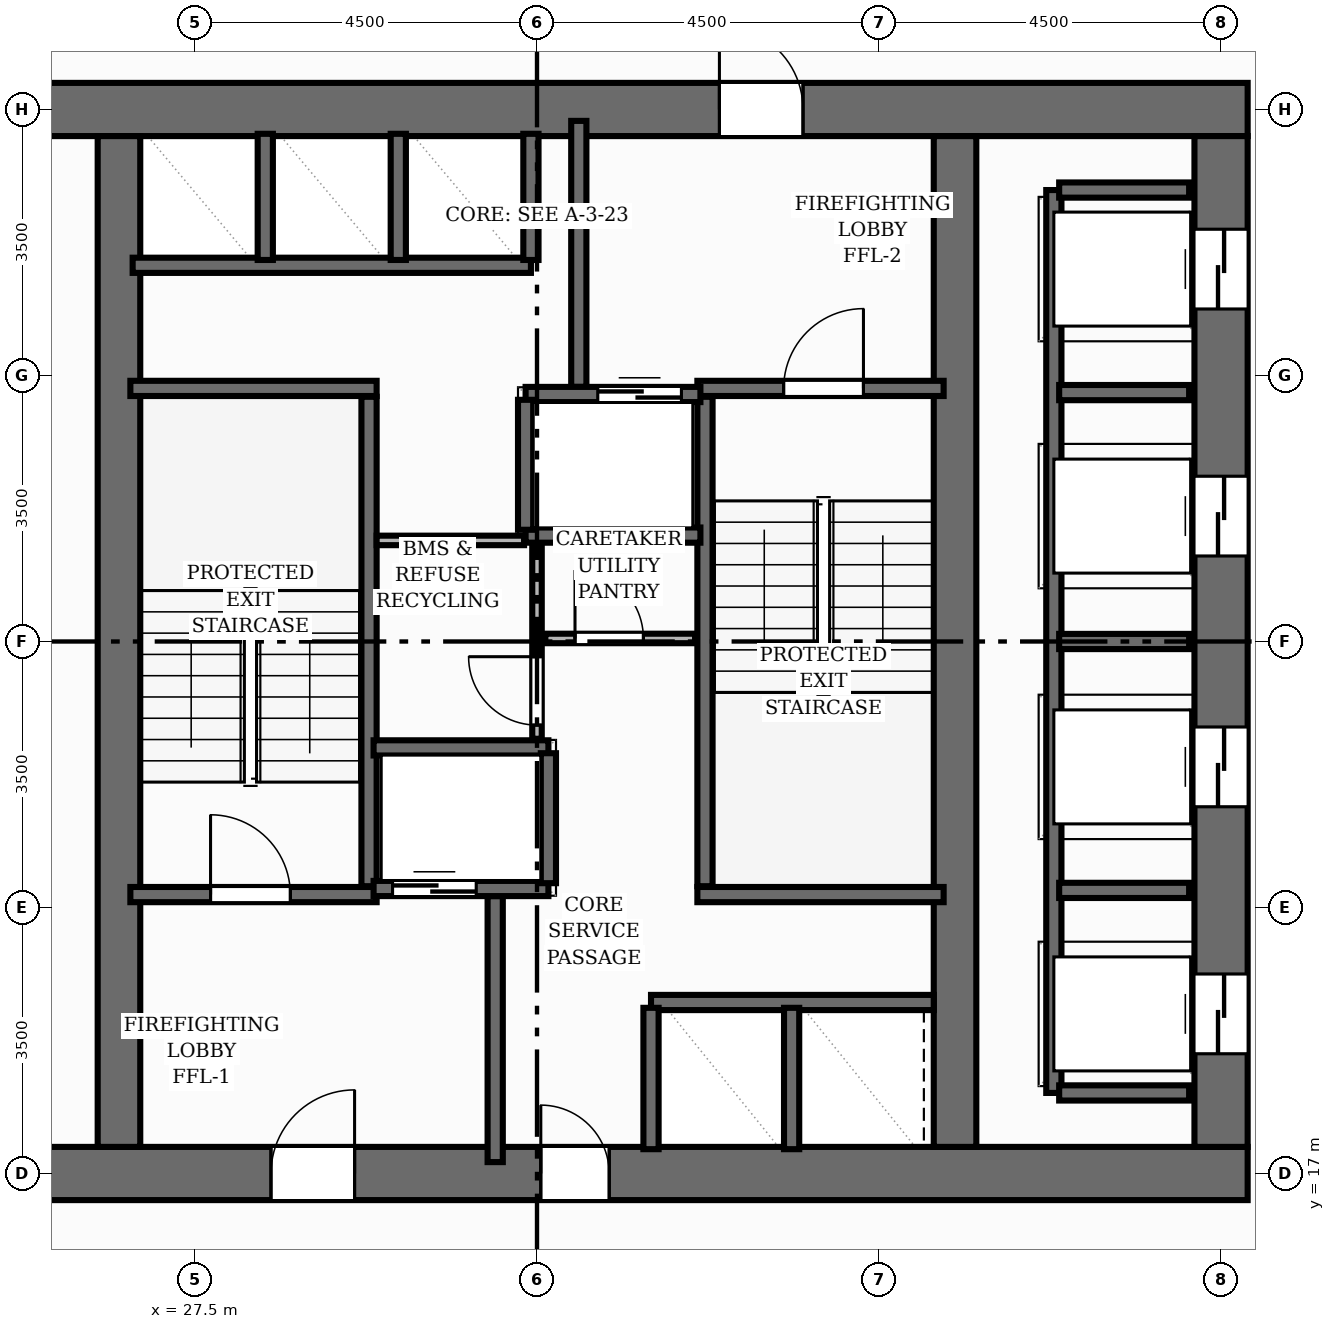
"""IFC4 building model, lengths in metres.
Left out: names, types, materials, properties, quantities, classifications, styles, units other than length and angle.
Written with IfcOpenShell. Run it as: python <this file> out.ifc"""

import sys

from ifc_helpers import new_model, si_unit, direction, frame, frame_2d, origin, place, context, subcontext, project, spatial, rectangle, extrude, element, fill, save


model = new_model("IFC4")
c1 = context("Model", 3, precision=1e-05, world=origin(), true_north=direction((0.0, 1.0)))
c2 = subcontext(c1, "Body", "Model", "MODEL_VIEW")
j1 = project(units=[si_unit("LENGTHUNIT", "METRE"), si_unit("PLANEANGLEUNIT", "RADIAN")], contexts=[c1])
p1 = place(None, origin())
s1 = spatial("IfcSite", under=j1, at=p1, CompositionType="ELEMENT")
p2 = place(p1, origin())
s2 = spatial("IfcBuilding", under=s1, at=p2, CompositionType="ELEMENT")
p3 = place(p2, frame((0.0, 0.0, 90.08)))
s3 = spatial("IfcBuildingStorey", under=s2, at=p3, CompositionType="ELEMENT", Elevation=90.08)
p4 = place(p3, frame((22.65, 17.0, 0.0), z_axis=(0.0, 0.0, 1.0), x_axis=(1.0, 0.0, 0.0)))
e1 = element("IfcWall", 1, at=p4, inside=s3, PredefinedType="SHEAR", context=c2, shape_type="SweptSolid", body=[
    extrude(rectangle(XDim=18.7, YDim=0.7, at=frame_2d((9.35, 0.0))), origin(), (0.0, 0.0, 1.0), 3.2),
])
p5 = place(p4, frame((5.85, 0.0, 0.0)))
e2 = element("IfcOpeningElement", 2, at=p5, cuts=e1, PredefinedType="OPENING", context=c2, shape_type="SweptSolid", body=[
    extrude(rectangle(XDim=1.1, YDim=2.15, at=frame_2d((0.55, 1.075))), frame((0.0, 0.36, 0.0), z_axis=(0.0, -1.0, 0.0), x_axis=(1.0, 0.0, 0.0)), (0.0, 0.0, 1.0), 0.72),
])
p6 = place(p4, frame((9.4, 0.0, 0.0)))
e3 = element("IfcOpeningElement", 3, at=p6, cuts=e1, PredefinedType="OPENING", context=c2, shape_type="SweptSolid", body=[
    extrude(rectangle(XDim=0.9, YDim=2.1, at=frame_2d((0.45, 1.05))), frame((0.0, 0.36, 0.0), z_axis=(0.0, -1.0, 0.0), x_axis=(1.0, 0.0, 0.0)), (0.0, 0.0, 1.0), 0.72),
])
p7 = place(p3, frame((22.65, 31.0, 0.0), z_axis=(0.0, 0.0, 1.0), x_axis=(1.0, 0.0, 0.0)))
e4 = element("IfcWall", 4, at=p7, inside=s3, PredefinedType="SHEAR", context=c2, shape_type="SweptSolid", body=[
    extrude(rectangle(XDim=18.7, YDim=0.7, at=frame_2d((9.35, 0.0))), origin(), (0.0, 0.0, 1.0), 3.2),
])
p8 = place(p7, frame((11.75, 0.0, 0.0)))
e5 = element("IfcOpeningElement", 5, at=p8, cuts=e4, PredefinedType="OPENING", context=c2, shape_type="SweptSolid", body=[
    extrude(rectangle(XDim=1.1, YDim=2.15, at=frame_2d((0.55, 1.075))), frame((0.0, 0.36, 0.0), z_axis=(0.0, -1.0, 0.0), x_axis=(1.0, 0.0, 0.0)), (0.0, 0.0, 1.0), 0.72),
])
p9 = place(p3, frame((41.0, 17.35, 0.0), z_axis=(0.0, 0.0, 1.0), x_axis=(0.0, 1.0, 0.0)))
e6 = element("IfcWall", 6, at=p9, inside=s3, PredefinedType="SHEAR", context=c2, shape_type="SweptSolid", body=[
    extrude(rectangle(XDim=13.3, YDim=0.7, at=frame_2d((6.65, 0.0))), origin(), (0.0, 0.0, 1.0), 3.2),
])
p10 = place(p9, frame((1.225, 0.0, 0.0)))
e7 = element("IfcOpeningElement", 7, at=p10, cuts=e6, PredefinedType="OPENING", context=c2, shape_type="SweptSolid", body=[
    extrude(rectangle(XDim=1.05, YDim=2.15, at=frame_2d((0.525, 1.075))), frame((0.0, 0.36, 0.0), z_axis=(0.0, -1.0, 0.0), x_axis=(1.0, 0.0, 0.0)), (0.0, 0.0, 1.0), 0.72),
])
p11 = place(p9, frame((4.475, 0.0, 0.0)))
e8 = element("IfcOpeningElement", 8, at=p11, cuts=e6, PredefinedType="OPENING", context=c2, shape_type="SweptSolid", body=[
    extrude(rectangle(XDim=1.05, YDim=2.15, at=frame_2d((0.525, 1.075))), frame((0.0, 0.36, 0.0), z_axis=(0.0, -1.0, 0.0), x_axis=(1.0, 0.0, 0.0)), (0.0, 0.0, 1.0), 0.72),
])
p12 = place(p9, frame((7.775, 0.0, 0.0)))
e9 = element("IfcOpeningElement", 9, at=p12, cuts=e6, PredefinedType="OPENING", context=c2, shape_type="SweptSolid", body=[
    extrude(rectangle(XDim=1.05, YDim=2.15, at=frame_2d((0.525, 1.075))), frame((0.0, 0.36, 0.0), z_axis=(0.0, -1.0, 0.0), x_axis=(1.0, 0.0, 0.0)), (0.0, 0.0, 1.0), 0.72),
])
p13 = place(p9, frame((11.025, 0.0, 0.0)))
e10 = element("IfcOpeningElement", 10, at=p13, cuts=e6, PredefinedType="OPENING", context=c2, shape_type="SweptSolid", body=[
    extrude(rectangle(XDim=1.05, YDim=2.15, at=frame_2d((0.525, 1.075))), frame((0.0, 0.36, 0.0), z_axis=(0.0, -1.0, 0.0), x_axis=(1.0, 0.0, 0.0)), (0.0, 0.0, 1.0), 0.72),
])
for number, where, z_axis, x_axis in (
    (11, (26.5, 17.35, 0.0), (0.0, 0.0, 1.0), (0.0, 1.0, 0.0)),
    (12, (37.5, 17.35, 0.0), (0.0, 0.0, 1.0), (0.0, 1.0, 0.0)),
):
    element("IfcWall", number, at=place(p3, frame(where, z_axis=z_axis, x_axis=x_axis)), inside=s3, PredefinedType="SHEAR", context=c2, shape_type="SweptSolid", body=[
        extrude(rectangle(XDim=13.3, YDim=0.56, at=frame_2d((6.65, 0.0))), origin(), (0.0, 0.0, 1.0), 3.2),
    ])
p14 = place(p3, frame((29.79, 20.78, 0.0), z_axis=(0.0, 0.0, 1.0), x_axis=(0.0, 1.0, 0.0)))
e13 = element("IfcWall", 13, at=p14, inside=s3, PredefinedType="SHEAR", context=c2, shape_type="SweptSolid", body=[
    extrude(rectangle(XDim=6.44, YDim=0.2, at=frame_2d((3.22, 0.0))), origin(), (0.0, 0.0, 1.0), 3.2),
])
p15 = place(p3, frame((26.65, 27.33, 0.0), z_axis=(0.0, 0.0, 1.0), x_axis=(1.0, 0.0, 0.0)))
e14 = element("IfcWall", 14, at=p15, inside=s3, PredefinedType="SHEAR", context=c2, shape_type="SweptSolid", body=[
    extrude(rectangle(XDim=3.24, YDim=0.2, at=frame_2d((1.62, 0.0))), origin(), (0.0, 0.0, 1.0), 3.2),
])
p16 = place(p3, frame((26.65, 20.67, 0.0), z_axis=(0.0, 0.0, 1.0), x_axis=(1.0, 0.0, 0.0)))
e15 = element("IfcWall", 15, at=p16, inside=s3, PredefinedType="SHEAR", context=c2, shape_type="SweptSolid", body=[
    extrude(rectangle(XDim=3.24, YDim=0.2, at=frame_2d((1.62, 0.0))), origin(), (0.0, 0.0, 1.0), 3.2),
])
p17 = place(p16, frame((1.055, 0.0, 0.0)))
e16 = element("IfcOpeningElement", 16, at=p17, cuts=e15, PredefinedType="OPENING", context=c2, shape_type="SweptSolid", body=[
    extrude(rectangle(XDim=1.05, YDim=2.15, at=frame_2d((0.525, 1.075))), frame((0.0, 0.11, 0.0), z_axis=(0.0, -1.0, 0.0), x_axis=(1.0, 0.0, 0.0)), (0.0, 0.0, 1.0), 0.22),
])
p18 = place(p3, frame((34.21, 20.78, 0.0), z_axis=(0.0, 0.0, 1.0), x_axis=(0.0, 1.0, 0.0)))
e17 = element("IfcWall", 17, at=p18, inside=s3, PredefinedType="SHEAR", context=c2, shape_type="SweptSolid", body=[
    extrude(rectangle(XDim=6.44, YDim=0.2, at=frame_2d((3.22, 0.0))), origin(), (0.0, 0.0, 1.0), 3.2),
])
p19 = place(p3, frame((34.11, 20.67, 0.0), z_axis=(0.0, 0.0, 1.0), x_axis=(1.0, 0.0, 0.0)))
e18 = element("IfcWall", 18, at=p19, inside=s3, PredefinedType="SHEAR", context=c2, shape_type="SweptSolid", body=[
    extrude(rectangle(XDim=3.24, YDim=0.2, at=frame_2d((1.62, 0.0))), origin(), (0.0, 0.0, 1.0), 3.2),
])
p20 = place(p3, frame((34.11, 27.33, 0.0), z_axis=(0.0, 0.0, 1.0), x_axis=(1.0, 0.0, 0.0)))
e19 = element("IfcWall", 19, at=p20, inside=s3, PredefinedType="SHEAR", context=c2, shape_type="SweptSolid", body=[
    extrude(rectangle(XDim=3.24, YDim=0.2, at=frame_2d((1.62, 0.0))), origin(), (0.0, 0.0, 1.0), 3.2),
])
p21 = place(p20, frame((1.135, 0.0, 0.0)))
e20 = element("IfcOpeningElement", 20, at=p21, cuts=e19, PredefinedType="OPENING", context=c2, shape_type="SweptSolid", body=[
    extrude(rectangle(XDim=1.05, YDim=2.15, at=frame_2d((0.525, 1.075))), frame((0.0, 0.11, 0.0), z_axis=(0.0, -1.0, 0.0), x_axis=(1.0, 0.0, 0.0)), (0.0, 0.0, 1.0), 0.22),
])
for number, where, z_axis, x_axis in (
    (21, (31.45, 17.15, 0.0), (0.0, 0.0, 1.0), (0.0, 1.0, 0.0)),
    (22, (32.55, 27.35, 0.0), (0.0, 0.0, 1.0), (0.0, 1.0, 0.0)),
):
    element("IfcWall", number, at=place(p3, frame(where, z_axis=z_axis, x_axis=x_axis)), inside=s3, PredefinedType="SHEAR", context=c2, shape_type="SweptSolid", body=[
        extrude(rectangle(XDim=3.5, YDim=0.2, at=frame_2d((1.75, 0.0))), origin(), (0.0, 0.0, 1.0), 3.2),
    ])
p22 = place(p3, frame((29.85, 20.75, 0.0), z_axis=(0.0, 0.0, 1.0), x_axis=(1.0, 0.0, 0.0)))
e23 = element("IfcWall", 23, at=p22, inside=s3, PredefinedType="SHEAR", context=c2, shape_type="SweptSolid", body=[
    extrude(rectangle(XDim=2.3, YDim=0.2, at=frame_2d((1.15, 0.0))), origin(), (0.0, 0.0, 1.0), 3.2),
])
p23 = place(p22, frame((0.25, 0.0, 0.0)))
e24 = element("IfcOpeningElement", 24, at=p23, cuts=e23, PredefinedType="OPENING", context=c2, shape_type="SweptSolid", body=[
    extrude(rectangle(XDim=1.1, YDim=2.15, at=frame_2d((0.55, 1.075))), frame((0.0, 0.11, 0.0), z_axis=(0.0, -1.0, 0.0), x_axis=(1.0, 0.0, 0.0)), (0.0, 0.0, 1.0), 0.22),
])
p24 = place(p3, frame((29.85, 22.6, 0.0), z_axis=(0.0, 0.0, 1.0), x_axis=(1.0, 0.0, 0.0)))
e25 = element("IfcWall", 25, at=p24, inside=s3, PredefinedType="SHEAR", context=c2, shape_type="SweptSolid", body=[
    extrude(rectangle(XDim=2.3, YDim=0.2, at=frame_2d((1.15, 0.0))), origin(), (0.0, 0.0, 1.0), 3.2),
])
p25 = place(p3, frame((32.15, 20.82, 0.0), z_axis=(0.0, 0.0, 1.0), x_axis=(0.0, 1.0, 0.0)))
e26 = element("IfcWall", 26, at=p25, inside=s3, PredefinedType="SHEAR", context=c2, shape_type="SweptSolid", body=[
    extrude(rectangle(XDim=1.71, YDim=0.2, at=frame_2d((0.855, 0.0))), origin(), (0.0, 0.0, 1.0), 3.2),
])
p26 = place(p3, frame((31.85, 27.25, 0.0), z_axis=(0.0, 0.0, 1.0), x_axis=(1.0, 0.0, 0.0)))
e27 = element("IfcWall", 27, at=p26, inside=s3, PredefinedType="SHEAR", context=c2, shape_type="SweptSolid", body=[
    extrude(rectangle(XDim=2.3, YDim=0.2, at=frame_2d((1.15, 0.0))), origin(), (0.0, 0.0, 1.0), 3.2),
])
p27 = place(p26, frame((0.95, 0.0, 0.0)))
e28 = element("IfcOpeningElement", 28, at=p27, cuts=e27, PredefinedType="OPENING", context=c2, shape_type="SweptSolid", body=[
    extrude(rectangle(XDim=1.1, YDim=2.15, at=frame_2d((0.55, 1.075))), frame((0.0, 0.11, 0.0), z_axis=(0.0, -1.0, 0.0), x_axis=(1.0, 0.0, 0.0)), (0.0, 0.0, 1.0), 0.22),
])
p28 = place(p3, frame((31.85, 25.4, 0.0), z_axis=(0.0, 0.0, 1.0), x_axis=(1.0, 0.0, 0.0)))
e29 = element("IfcWall", 29, at=p28, inside=s3, PredefinedType="SHEAR", context=c2, shape_type="SweptSolid", body=[
    extrude(rectangle(XDim=2.3, YDim=0.2, at=frame_2d((1.15, 0.0))), origin(), (0.0, 0.0, 1.0), 3.2),
])
p29 = place(p3, frame((31.85, 25.47, 0.0), z_axis=(0.0, 0.0, 1.0), x_axis=(0.0, 1.0, 0.0)))
e30 = element("IfcWall", 30, at=p29, inside=s3, PredefinedType="SHEAR", context=c2, shape_type="SweptSolid", body=[
    extrude(rectangle(XDim=1.71, YDim=0.2, at=frame_2d((0.855, 0.0))), origin(), (0.0, 0.0, 1.0), 3.2),
])
p30 = place(p3, frame((38.8, 18.06, 0.0), z_axis=(0.0, 0.0, 1.0), x_axis=(0.0, 1.0, 0.0)))
e31 = element("IfcWall", 31, at=p30, inside=s3, PredefinedType="SHEAR", context=c2, shape_type="SweptSolid", body=[
    extrude(rectangle(XDim=11.88, YDim=0.2, at=frame_2d((5.94, 0.0))), origin(), (0.0, 0.0, 1.0), 3.2),
])
for number, where, z_axis, x_axis in (
    (32, (38.87, 18.06, 0.0), (0.0, 0.0, 1.0), (1.0, 0.0, 0.0)),
    (33, (38.87, 29.94, 0.0), (0.0, 0.0, 1.0), (1.0, 0.0, 0.0)),
    (34, (38.87, 20.725, 0.0), (0.0, 0.0, 1.0), (1.0, 0.0, 0.0)),
    (35, (38.87, 24.0, 0.0), (0.0, 0.0, 1.0), (1.0, 0.0, 0.0)),
    (36, (38.87, 27.275, 0.0), (0.0, 0.0, 1.0), (1.0, 0.0, 0.0)),
):
    element("IfcWall", number, at=place(p3, frame(where, z_axis=z_axis, x_axis=x_axis)), inside=s3, PredefinedType="SHEAR", context=c2, shape_type="SweptSolid", body=[
        extrude(rectangle(XDim=1.71, YDim=0.2, at=frame_2d((0.855, 0.0))), origin(), (0.0, 0.0, 1.0), 3.2),
    ])
p31 = place(p3, frame((26.68, 28.95, 0.0), z_axis=(0.0, 0.0, 1.0), x_axis=(1.0, 0.0, 0.0)))
e37 = element("IfcWall", 37, at=p31, inside=s3, PredefinedType="SHEAR", context=c2, shape_type="SweptSolid", body=[
    extrude(rectangle(XDim=5.24, YDim=0.2, at=frame_2d((2.62, 0.0))), origin(), (0.0, 0.0, 1.0), 3.2),
])
for number, where, z_axis, x_axis in (
    (38, (31.92, 29.02, 0.0), (0.0, 0.0, 1.0), (0.0, 1.0, 0.0)),
    (39, (28.425, 29.02, 0.0), (0.0, 0.0, 1.0), (0.0, 1.0, 0.0)),
    (40, (30.175, 29.02, 0.0), (0.0, 0.0, 1.0), (0.0, 1.0, 0.0)),
):
    element("IfcWall", number, at=place(p3, frame(where, z_axis=z_axis, x_axis=x_axis)), inside=s3, PredefinedType="SHEAR", context=c2, shape_type="SweptSolid", body=[
        extrude(rectangle(XDim=1.66, YDim=0.2, at=frame_2d((0.83, 0.0))), origin(), (0.0, 0.0, 1.0), 3.2),
    ])
p32 = place(p3, frame((33.5, 19.25, 0.0), z_axis=(0.0, 0.0, 1.0), x_axis=(1.0, 0.0, 0.0)))
e41 = element("IfcWall", 41, at=p32, inside=s3, PredefinedType="SHEAR", context=c2, shape_type="SweptSolid", body=[
    extrude(rectangle(XDim=3.72, YDim=0.2, at=frame_2d((1.86, 0.0))), origin(), (0.0, 0.0, 1.0), 3.2),
])
for number, where, z_axis, x_axis in (
    (42, (33.5, 17.32, 0.0), (0.0, 0.0, 1.0), (0.0, 1.0, 0.0)),
    (43, (35.35, 17.32, 0.0), (0.0, 0.0, 1.0), (0.0, 1.0, 0.0)),
):
    element("IfcWall", number, at=place(p3, frame(where, z_axis=z_axis, x_axis=x_axis)), inside=s3, PredefinedType="SHEAR", context=c2, shape_type="SweptSolid", body=[
        extrude(rectangle(XDim=1.86, YDim=0.2, at=frame_2d((0.93, 0.0))), origin(), (0.0, 0.0, 1.0), 3.2),
    ])
p33 = place(p3, frame((32.0, 22.72, 0.0), z_axis=(0.0, 0.0, 1.0), x_axis=(0.0, 1.0, 0.0)))
e44 = element("IfcWall", 44, at=p33, inside=s3, PredefinedType="PARTITIONING", context=c2, shape_type="SweptSolid", body=[
    extrude(rectangle(XDim=2.52, YDim=0.125, at=frame_2d((1.26, 0.0))), origin(), (0.0, 0.0, 1.0), 2.955),
])
p34 = place(p33, frame((0.18, 0.0, 0.0)))
e45 = element("IfcOpeningElement", 45, at=p34, cuts=e44, PredefinedType="OPENING", context=c2, shape_type="SweptSolid", body=[
    extrude(rectangle(XDim=0.9, YDim=2.1, at=frame_2d((0.45, 1.05))), frame((0.0, 0.073, 0.0), z_axis=(0.0, -1.0, 0.0), x_axis=(1.0, 0.0, 0.0)), (0.0, 0.0, 1.0), 0.145),
])
p35 = place(p3, frame((32.11, 24.04, 0.0), z_axis=(0.0, 0.0, 1.0), x_axis=(1.0, 0.0, 0.0)))
e46 = element("IfcWall", 46, at=p35, inside=s3, PredefinedType="PARTITIONING", context=c2, shape_type="SweptSolid", body=[
    extrude(rectangle(XDim=1.97, YDim=0.125, at=frame_2d((0.985, 0.0))), origin(), (0.0, 0.0, 1.0), 2.955),
])
p36 = place(p35, frame((0.39, 0.0, 0.0)))
e47 = element("IfcOpeningElement", 47, at=p36, cuts=e46, PredefinedType="OPENING", context=c2, shape_type="SweptSolid", body=[
    extrude(rectangle(XDim=0.9, YDim=2.1, at=frame_2d((0.45, 1.05))), frame((0.0, 0.073, 0.0), z_axis=(0.0, -1.0, 0.0), x_axis=(1.0, 0.0, 0.0)), (0.0, 0.0, 1.0), 0.145),
])
p37 = place(p3, frame((29.89, 25.33, 0.0), z_axis=(0.0, 0.0, 1.0), x_axis=(1.0, 0.0, 0.0)))
e48 = element("IfcWall", 48, at=p37, inside=s3, PredefinedType="PARTITIONING", context=c2, shape_type="SweptSolid", body=[
    extrude(rectangle(XDim=1.94, YDim=0.125, at=frame_2d((0.97, 0.0))), origin(), (0.0, 0.0, 1.0), 2.955),
])
p38 = place(p17, origin())
e49 = element("IfcDoor", 49, at=p38, inside=s3, OperationType="SINGLE_SWING_LEFT", PredefinedType="DOOR", context=c2, shape_type="SweptSolid", body=[
    extrude(rectangle(XDim=1.05, YDim=2.15, at=frame_2d((0.525, 1.075))), frame((0.0, 0.025, 0.0), z_axis=(0.0, -1.0, 0.0), x_axis=(1.0, 0.0, 0.0)), (0.0, 0.0, 1.0), 0.05),
])
fill(e16, e49)
p39 = place(p21, origin())
e50 = element("IfcDoor", 50, at=p39, inside=s3, OperationType="SINGLE_SWING_RIGHT", PredefinedType="DOOR", context=c2, shape_type="SweptSolid", body=[
    extrude(rectangle(XDim=1.05, YDim=2.15, at=frame_2d((0.525, 1.075))), frame((0.0, 0.025, 0.0), z_axis=(0.0, -1.0, 0.0), x_axis=(1.0, 0.0, 0.0)), (0.0, 0.0, 1.0), 0.05),
])
fill(e20, e50)
p40 = place(p5, origin())
e51 = element("IfcDoor", 51, at=p40, inside=s3, OperationType="SINGLE_SWING_RIGHT", PredefinedType="DOOR", context=c2, shape_type="SweptSolid", body=[
    extrude(rectangle(XDim=1.1, YDim=2.15, at=frame_2d((0.55, 1.075))), frame((0.0, 0.025, 0.0), z_axis=(0.0, -1.0, 0.0), x_axis=(1.0, 0.0, 0.0)), (0.0, 0.0, 1.0), 0.05),
])
fill(e2, e51)
p41 = place(p8, origin())
e52 = element("IfcDoor", 52, at=p41, inside=s3, OperationType="SINGLE_SWING_LEFT", PredefinedType="DOOR", context=c2, shape_type="SweptSolid", body=[
    extrude(rectangle(XDim=1.1, YDim=2.15, at=frame_2d((0.55, 1.075))), frame((0.0, 0.025, 0.0), z_axis=(0.0, -1.0, 0.0), x_axis=(1.0, 0.0, 0.0)), (0.0, 0.0, 1.0), 0.05),
])
fill(e5, e52)
p42 = place(p23, origin())
e53 = element("IfcDoor", 53, at=p42, inside=s3, OperationType="DOUBLE_DOOR_SLIDING", PredefinedType="DOOR", context=c2, shape_type="SweptSolid", body=[
    extrude(rectangle(XDim=1.1, YDim=2.15, at=frame_2d((0.55, 1.075))), frame((0.0, 0.025, 0.0), z_axis=(0.0, -1.0, 0.0), x_axis=(1.0, 0.0, 0.0)), (0.0, 0.0, 1.0), 0.05),
])
fill(e24, e53)
p43 = place(p27, origin())
e54 = element("IfcDoor", 54, at=p43, inside=s3, OperationType="DOUBLE_DOOR_SLIDING", PredefinedType="DOOR", context=c2, shape_type="SweptSolid", body=[
    extrude(rectangle(XDim=1.1, YDim=2.15, at=frame_2d((0.55, 1.075))), frame((0.0, 0.025, 0.0), z_axis=(0.0, -1.0, 0.0), x_axis=(1.0, 0.0, 0.0)), (0.0, 0.0, 1.0), 0.05),
])
fill(e28, e54)
p44 = place(p10, origin())
e55 = element("IfcDoor", 55, at=p44, inside=s3, OperationType="DOUBLE_DOOR_SLIDING", PredefinedType="DOOR", context=c2, shape_type="SweptSolid", body=[
    extrude(rectangle(XDim=1.05, YDim=2.15, at=frame_2d((0.525, 1.075))), frame((0.0, 0.025, 0.0), z_axis=(0.0, -1.0, 0.0), x_axis=(1.0, 0.0, 0.0)), (0.0, 0.0, 1.0), 0.05),
])
fill(e7, e55)
p45 = place(p11, origin())
e56 = element("IfcDoor", 56, at=p45, inside=s3, OperationType="DOUBLE_DOOR_SLIDING", PredefinedType="DOOR", context=c2, shape_type="SweptSolid", body=[
    extrude(rectangle(XDim=1.05, YDim=2.15, at=frame_2d((0.525, 1.075))), frame((0.0, 0.025, 0.0), z_axis=(0.0, -1.0, 0.0), x_axis=(1.0, 0.0, 0.0)), (0.0, 0.0, 1.0), 0.05),
])
fill(e8, e56)
p46 = place(p12, origin())
e57 = element("IfcDoor", 57, at=p46, inside=s3, OperationType="DOUBLE_DOOR_SLIDING", PredefinedType="DOOR", context=c2, shape_type="SweptSolid", body=[
    extrude(rectangle(XDim=1.05, YDim=2.15, at=frame_2d((0.525, 1.075))), frame((0.0, 0.025, 0.0), z_axis=(0.0, -1.0, 0.0), x_axis=(1.0, 0.0, 0.0)), (0.0, 0.0, 1.0), 0.05),
])
fill(e9, e57)
p47 = place(p13, origin())
e58 = element("IfcDoor", 58, at=p47, inside=s3, OperationType="DOUBLE_DOOR_SLIDING", PredefinedType="DOOR", context=c2, shape_type="SweptSolid", body=[
    extrude(rectangle(XDim=1.05, YDim=2.15, at=frame_2d((0.525, 1.075))), frame((0.0, 0.025, 0.0), z_axis=(0.0, -1.0, 0.0), x_axis=(1.0, 0.0, 0.0)), (0.0, 0.0, 1.0), 0.05),
])
fill(e10, e58)
p48 = place(p6, origin())
e59 = element("IfcDoor", 59, at=p48, inside=s3, OperationType="SINGLE_SWING_LEFT", PredefinedType="DOOR", context=c2, shape_type="SweptSolid", body=[
    extrude(rectangle(XDim=0.9, YDim=2.1, at=frame_2d((0.45, 1.05))), frame((0.0, 0.025, 0.0), z_axis=(0.0, -1.0, 0.0), x_axis=(1.0, 0.0, 0.0)), (0.0, 0.0, 1.0), 0.05),
])
fill(e3, e59)
p49 = place(p36, origin())
e60 = element("IfcDoor", 60, at=p49, inside=s3, OperationType="SINGLE_SWING_LEFT", PredefinedType="DOOR", context=c2, shape_type="SweptSolid", body=[
    extrude(rectangle(XDim=0.9, YDim=2.1, at=frame_2d((0.45, 1.05))), frame((0.0, 0.025, 0.0), z_axis=(0.0, -1.0, 0.0), x_axis=(1.0, 0.0, 0.0)), (0.0, 0.0, 1.0), 0.05),
])
fill(e47, e60)
p50 = place(p34, origin())
e61 = element("IfcDoor", 61, at=p50, inside=s3, OperationType="SINGLE_SWING_RIGHT", PredefinedType="DOOR", context=c2, shape_type="SweptSolid", body=[
    extrude(rectangle(XDim=0.9, YDim=2.1, at=frame_2d((0.45, 1.05))), frame((0.0, 0.025, 0.0), z_axis=(0.0, -1.0, 0.0), x_axis=(1.0, 0.0, 0.0)), (0.0, 0.0, 1.0), 0.05),
])
fill(e45, e61)
save(model, sys.argv[1])
